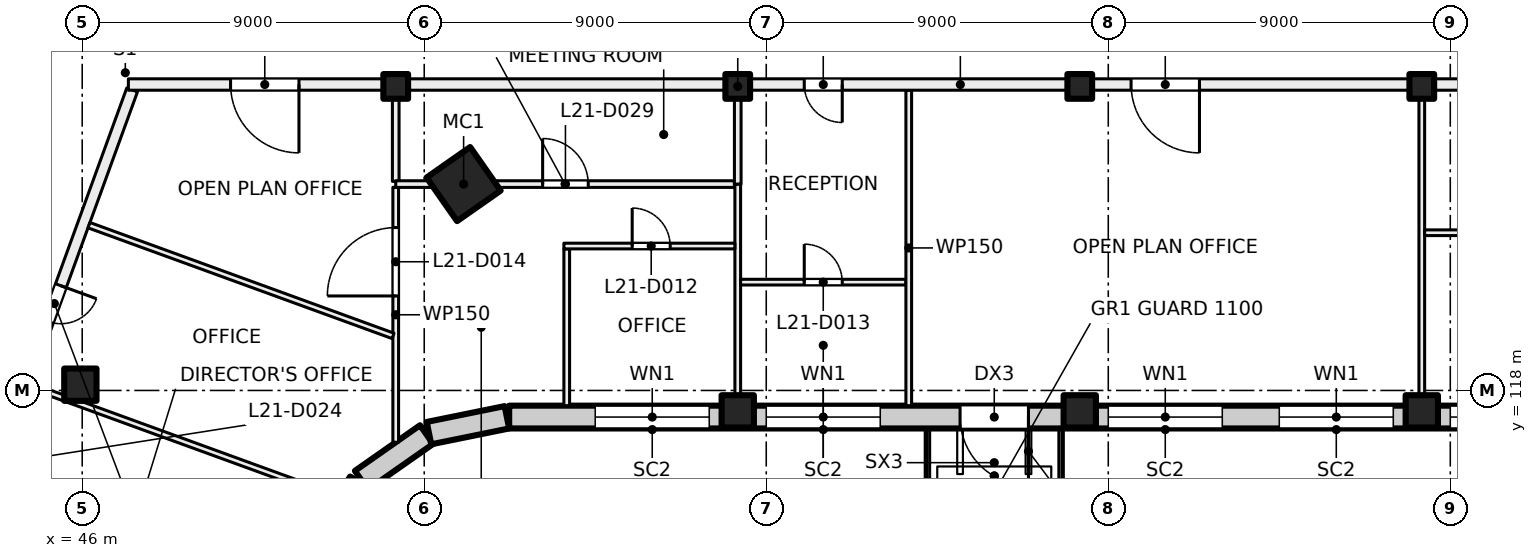
"""IFC4 building model, lengths in metres.
Left out: names, types, materials, properties, quantities, classifications, styles, units other than length and angle.
Written with IfcOpenShell. Run it as: python <this file> out.ifc"""

import sys

from ifc_helpers import new_model, si_unit, direction, frame, frame_2d, origin, origin_2d, place, context, subcontext, project, spatial, rectangle, hollow_rectangle, extrude, element, fill, save


model = new_model("IFC4")
c1 = context("Model", 3, precision=1e-05, world=origin(), true_north=direction((0.0, 1.0)))
c2 = subcontext(c1, "Body", "Model", "MODEL_VIEW")
j1 = project(units=[si_unit("LENGTHUNIT", "METRE"), si_unit("PLANEANGLEUNIT", "RADIAN")], contexts=[c1])
p1 = place(None, origin())
s1 = spatial("IfcSite", under=j1, at=p1, CompositionType="ELEMENT")
p2 = place(p1, origin())
s2 = spatial("IfcBuilding", under=s1, at=p2, CompositionType="ELEMENT")
p3 = place(p2, frame((0.0, 0.0, 93.0)))
s3 = spatial("IfcBuildingStorey", under=s2, at=p3, CompositionType="ELEMENT", Elevation=93.0)
p4 = place(p3, frame((56.036, 123.43, 0.0), z_axis=(0.0, 0.0, 1.0), x_axis=(0.573576436351, -0.819152044289, 0.0)))
e1 = element("IfcColumn", 1, at=p4, inside=s3, PredefinedType="COLUMN", context=c2, shape_type="SweptSolid", body=[
    extrude(hollow_rectangle(XDim=1.4, YDim=1.4, WallThickness=0.04, at=origin_2d()), origin(), (0.0, 0.0, 1.0), 4.0),
])
for number, where, z_axis, x_axis in (
    (2, (54.25, 126.0, 0.0), (0.0, 0.0, 1.0), (1.0, 0.0, 0.0)),
    (3, (63.25, 126.0, 0.0), (0.0, 0.0, 1.0), (1.0, 0.0, 0.0)),
    (4, (72.25, 126.0, 0.0), (0.0, 0.0, 1.0), (1.0, 0.0, 0.0)),
    (5, (81.25, 126.0, 0.0), (0.0, 0.0, 1.0), (1.0, 0.0, 0.0)),
):
    element("IfcColumn", number, at=place(p3, frame(where, z_axis=z_axis, x_axis=x_axis)), inside=s3, PredefinedType="COLUMN", context=c2, shape_type="SweptSolid", body=[
        extrude(rectangle(XDim=0.65, YDim=0.65, at=origin_2d()), origin(), (0.0, 0.0, 1.0), 4.0),
    ])
for number, where, z_axis, x_axis in (
    (6, (45.952, 118.152, 0.0), (0.0, 0.0, 1.0), (1.0, 0.0, 0.0)),
    (7, (63.25, 117.45, 0.0), (0.0, 0.0, 1.0), (1.0, 0.0, 0.0)),
    (8, (72.25, 117.45, 0.0), (0.0, 0.0, 1.0), (1.0, 0.0, 0.0)),
    (9, (81.25, 117.45, 0.0), (0.0, 0.0, 1.0), (1.0, 0.0, 0.0)),
):
    element("IfcColumn", number, at=place(p3, frame(where, z_axis=z_axis, x_axis=x_axis)), inside=s3, PredefinedType="COLUMN", context=c2, shape_type="SweptSolid", body=[
        extrude(rectangle(XDim=0.85, YDim=0.85, at=origin_2d()), origin(), (0.0, 0.0, 1.0), 4.0),
    ])
p5 = place(p3, frame((53.305, 115.578, 0.0), z_axis=(0.0, 0.0, 1.0), x_axis=(-0.522402266438, -0.852699168535, 0.0)))
e10 = element("IfcWall", 10, at=p5, inside=s3, PredefinedType="SOLIDWALL", context=c2, shape_type="SweptSolid", body=[
    extrude(rectangle(XDim=2.042, YDim=0.6, at=frame_2d((1.021, 0.0))), origin(), (0.0, 0.0, 1.0), 3.625),
])
for number, where, z_axis, x_axis in (
    (11, (55.062, 116.839, 0.0), (0.0, 0.0, 1.0), (-0.819, -0.574, 0.0)),
    (12, (57.175, 117.294, 0.0), (0.0, 0.0, 1.0), (-0.98, -0.199, 0.0)),
):
    element("IfcWall", number, at=place(p3, frame(where, z_axis=z_axis, x_axis=x_axis)), inside=s3, PredefinedType="SOLIDWALL", context=c2, shape_type="SweptSolid", body=[
        extrude(rectangle(XDim=2.092, YDim=0.6, at=frame_2d((1.046, 0.0))), origin(), (0.0, 0.0, 1.0), 3.625),
    ])
p6 = place(p3, frame((90.98, 117.3, 0.0), z_axis=(0.0, 0.0, 1.0), x_axis=(-1.0, 0.0, 0.0)))
e13 = element("IfcWall", 13, at=p6, inside=s3, PredefinedType="SOLIDWALL", context=c2, shape_type="SweptSolid", body=[
    extrude(rectangle(XDim=33.745, YDim=0.6, at=frame_2d((16.873, 0.0))), origin(), (0.0, 0.0, 1.0), 3.625),
])
p7 = place(p6, frame((1.48, 0.0, 0.9)))
e14 = element("IfcOpeningElement", 14, at=p7, cuts=e13, PredefinedType="OPENING", context=c2, shape_type="SweptSolid", body=[
    extrude(rectangle(XDim=3.0, YDim=2.4, at=frame_2d((1.5, 1.2))), frame((0.0, 0.31, 0.0), z_axis=(0.0, -1.0, 0.0), x_axis=(1.0, 0.0, 0.0)), (0.0, 0.0, 1.0), 0.62),
])
p8 = place(p6, frame((5.98, 0.0, 0.9)))
e15 = element("IfcOpeningElement", 15, at=p8, cuts=e13, PredefinedType="OPENING", context=c2, shape_type="SweptSolid", body=[
    extrude(rectangle(XDim=3.0, YDim=2.4, at=frame_2d((1.5, 1.2))), frame((0.0, 0.31, 0.0), z_axis=(0.0, -1.0, 0.0), x_axis=(1.0, 0.0, 0.0)), (0.0, 0.0, 1.0), 0.62),
])
p9 = place(p6, frame((10.48, 0.0, 0.9)))
e16 = element("IfcOpeningElement", 16, at=p9, cuts=e13, PredefinedType="OPENING", context=c2, shape_type="SweptSolid", body=[
    extrude(rectangle(XDim=3.0, YDim=2.4, at=frame_2d((1.5, 1.2))), frame((0.0, 0.31, 0.0), z_axis=(0.0, -1.0, 0.0), x_axis=(1.0, 0.0, 0.0)), (0.0, 0.0, 1.0), 0.62),
])
p10 = place(p6, frame((14.98, 0.0, 0.9)))
e17 = element("IfcOpeningElement", 17, at=p10, cuts=e13, PredefinedType="OPENING", context=c2, shape_type="SweptSolid", body=[
    extrude(rectangle(XDim=3.0, YDim=2.4, at=frame_2d((1.5, 1.2))), frame((0.0, 0.31, 0.0), z_axis=(0.0, -1.0, 0.0), x_axis=(1.0, 0.0, 0.0)), (0.0, 0.0, 1.0), 0.62),
])
p11 = place(p6, frame((20.08, 0.0, 0.0)))
e18 = element("IfcOpeningElement", 18, at=p11, cuts=e13, PredefinedType="OPENING", context=c2, shape_type="SweptSolid", body=[
    extrude(rectangle(XDim=1.8, YDim=2.4, at=frame_2d((0.9, 1.2))), frame((0.0, 0.31, 0.0), z_axis=(0.0, -1.0, 0.0), x_axis=(1.0, 0.0, 0.0)), (0.0, 0.0, 1.0), 0.62),
])
p12 = place(p6, frame((23.98, 0.0, 0.9)))
e19 = element("IfcOpeningElement", 19, at=p12, cuts=e13, PredefinedType="OPENING", context=c2, shape_type="SweptSolid", body=[
    extrude(rectangle(XDim=3.0, YDim=2.4, at=frame_2d((1.5, 1.2))), frame((0.0, 0.31, 0.0), z_axis=(0.0, -1.0, 0.0), x_axis=(1.0, 0.0, 0.0)), (0.0, 0.0, 1.0), 0.62),
])
p13 = place(p6, frame((28.48, 0.0, 0.9)))
e20 = element("IfcOpeningElement", 20, at=p13, cuts=e13, PredefinedType="OPENING", context=c2, shape_type="SweptSolid", body=[
    extrude(rectangle(XDim=3.0, YDim=2.4, at=frame_2d((1.5, 1.2))), frame((0.0, 0.31, 0.0), z_axis=(0.0, -1.0, 0.0), x_axis=(1.0, 0.0, 0.0)), (0.0, 0.0, 1.0), 0.62),
])
p14 = place(p3, frame((44.639, 118.12, 0.0), z_axis=(0.0, 0.0, 1.0), x_axis=(0.939669707102, -0.342083091593, 0.0)))
e21 = element("IfcWall", 21, at=p14, inside=s3, PredefinedType="PARTITIONING", context=c2, shape_type="SweptSolid", body=[
    extrude(rectangle(XDim=8.589, YDim=0.15, at=frame_2d((4.295, 0.0))), origin(), (0.0, 0.0, 1.0), 3.625),
])
p15 = place(p3, frame((47.314, 125.909, 0.0), z_axis=(0.0, 0.0, 1.0), x_axis=(-0.342010770371, -0.939696032209, 0.0)))
e22 = element("IfcWall", 22, at=p15, inside=s3, PredefinedType="PARTITIONING", context=c2, shape_type="SweptSolid", body=[
    extrude(rectangle(XDim=31.485, YDim=0.3, at=frame_2d((15.742, 0.0))), origin(), (0.0, 0.0, 1.0), 3.625),
])
p16 = place(p15, frame((26.11, 0.0, 0.0)))
e23 = element("IfcOpeningElement", 23, at=p16, cuts=e22, PredefinedType="OPENING", context=c2, shape_type="SweptSolid", body=[
    extrude(rectangle(XDim=1.0, YDim=2.1, at=frame_2d((0.5, 1.05))), frame((0.0, 0.16, 0.0), z_axis=(0.0, -1.0, 0.0), x_axis=(1.0, 0.0, 0.0)), (0.0, 0.0, 1.0), 0.32),
])
p17 = place(p15, frame((15.485, 0.0, 0.0)))
e24 = element("IfcOpeningElement", 24, at=p17, cuts=e22, PredefinedType="OPENING", context=c2, shape_type="SweptSolid", body=[
    extrude(rectangle(XDim=1.0, YDim=2.1, at=frame_2d((0.5, 1.05))), frame((0.0, 0.16, 0.0), z_axis=(0.0, -1.0, 0.0), x_axis=(1.0, 0.0, 0.0)), (0.0, 0.0, 1.0), 0.32),
])
p18 = place(p15, frame((9.985, 0.0, 0.0)))
e25 = element("IfcOpeningElement", 25, at=p18, cuts=e22, PredefinedType="OPENING", context=c2, shape_type="SweptSolid", body=[
    extrude(rectangle(XDim=1.0, YDim=2.1, at=frame_2d((0.5, 1.05))), frame((0.0, 0.16, 0.0), z_axis=(0.0, -1.0, 0.0), x_axis=(1.0, 0.0, 0.0)), (0.0, 0.0, 1.0), 0.32),
])
p19 = place(p15, frame((5.484, 0.0, 0.0)))
e26 = element("IfcOpeningElement", 26, at=p19, cuts=e22, PredefinedType="OPENING", context=c2, shape_type="SweptSolid", body=[
    extrude(rectangle(XDim=1.0, YDim=2.1, at=frame_2d((0.5, 1.05))), frame((0.0, 0.16, 0.0), z_axis=(0.0, -1.0, 0.0), x_axis=(1.0, 0.0, 0.0)), (0.0, 0.0, 1.0), 0.32),
])
p20 = place(p3, frame((54.25, 116.637, 0.0), z_axis=(0.0, 0.0, 1.0), x_axis=(0.0, 1.0, 0.0)))
e27 = element("IfcWall", 27, at=p20, inside=s3, PredefinedType="PARTITIONING", context=c2, shape_type="SweptSolid", body=[
    extrude(rectangle(XDim=6.709, YDim=0.15, at=frame_2d((3.354, 0.0))), origin(), (0.0, 0.0, 1.0), 3.625),
])
p21 = place(p20, frame((3.85, 0.0, 0.0)))
e28 = element("IfcOpeningElement", 28, at=p21, cuts=e27, PredefinedType="OPENING", context=c2, shape_type="SweptSolid", body=[
    extrude(rectangle(XDim=1.8, YDim=2.1, at=frame_2d((0.9, 1.05))), frame((0.0, 0.085, 0.0), z_axis=(0.0, -1.0, 0.0), x_axis=(1.0, 0.0, 0.0)), (0.0, 0.0, 1.0), 0.17),
])
p22 = place(p3, frame((54.18, 119.436, 0.0), z_axis=(0.0, 0.0, 1.0), x_axis=(-0.939669476286, 0.342083725624, 0.0)))
e29 = element("IfcWall", 29, at=p22, inside=s3, PredefinedType="PARTITIONING", context=c2, shape_type="SweptSolid", body=[
    extrude(rectangle(XDim=8.516, YDim=0.15, at=frame_2d((4.258, 0.0))), origin(), (0.0, 0.0, 1.0), 3.625),
])
p23 = place(p3, frame((54.25, 123.502, 0.0), z_axis=(0.0, 0.0, 1.0), x_axis=(0.0, 1.0, 0.0)))
e30 = element("IfcWall", 30, at=p23, inside=s3, PredefinedType="PARTITIONING", context=c2, shape_type="SweptSolid", body=[
    extrude(rectangle(XDim=2.398, YDim=0.175, at=frame_2d((1.199, 0.0))), origin(), (0.0, 0.0, 1.0), 3.625),
])
p24 = place(p3, frame((54.25, 123.43, 0.0), z_axis=(0.0, 0.0, 1.0), x_axis=(1.0, 0.0, 0.0)))
e31 = element("IfcWall", 31, at=p24, inside=s3, PredefinedType="PARTITIONING", context=c2, shape_type="SweptSolid", body=[
    extrude(rectangle(XDim=8.912, YDim=0.175, at=frame_2d((4.456, 0.0))), origin(), (0.0, 0.0, 1.0), 3.625),
])
p25 = place(p24, frame((3.866, 0.0, 0.0)))
e32 = element("IfcOpeningElement", 32, at=p25, cuts=e31, PredefinedType="OPENING", context=c2, shape_type="SweptSolid", body=[
    extrude(rectangle(XDim=1.2, YDim=2.1, at=frame_2d((0.6, 1.05))), frame((0.0, 0.097, 0.0), z_axis=(0.0, -1.0, 0.0), x_axis=(1.0, 0.0, 0.0)), (0.0, 0.0, 1.0), 0.195),
])
p26 = place(p3, frame((58.75, 117.6, 0.0), z_axis=(0.0, 0.0, 1.0), x_axis=(0.0, 1.0, 0.0)))
e33 = element("IfcWall", 33, at=p26, inside=s3, PredefinedType="PARTITIONING", context=c2, shape_type="SweptSolid", body=[
    extrude(rectangle(XDim=4.125, YDim=0.15, at=frame_2d((2.062, 0.0))), origin(), (0.0, 0.0, 1.0), 3.625),
])
p27 = place(p3, frame((63.25, 117.6, 0.0), z_axis=(0.0, 0.0, 1.0), x_axis=(0.0, 1.0, 0.0)))
e34 = element("IfcWall", 34, at=p27, inside=s3, PredefinedType="PARTITIONING", context=c2, shape_type="SweptSolid", body=[
    extrude(rectangle(XDim=5.83, YDim=0.15, at=frame_2d((2.915, 0.0))), origin(), (0.0, 0.0, 1.0), 3.625),
])
p28 = place(p3, frame((63.325, 120.85, 0.0), z_axis=(0.0, 0.0, 1.0), x_axis=(1.0, 0.0, 0.0)))
e35 = element("IfcWall", 35, at=p28, inside=s3, PredefinedType="PARTITIONING", context=c2, shape_type="SweptSolid", body=[
    extrude(rectangle(XDim=4.35, YDim=0.15, at=frame_2d((2.175, 0.0))), origin(), (0.0, 0.0, 1.0), 3.625),
])
p29 = place(p28, frame((1.675, 0.0, 0.0)))
e36 = element("IfcOpeningElement", 36, at=p29, cuts=e35, PredefinedType="OPENING", context=c2, shape_type="SweptSolid", body=[
    extrude(rectangle(XDim=1.0, YDim=2.1, at=frame_2d((0.5, 1.05))), frame((0.0, 0.085, 0.0), z_axis=(0.0, -1.0, 0.0), x_axis=(1.0, 0.0, 0.0)), (0.0, 0.0, 1.0), 0.17),
])
p30 = place(p3, frame((58.675, 121.8, 0.0), z_axis=(0.0, 0.0, 1.0), x_axis=(1.0, 0.0, 0.0)))
e37 = element("IfcWall", 37, at=p30, inside=s3, PredefinedType="PARTITIONING", context=c2, shape_type="SweptSolid", body=[
    extrude(rectangle(XDim=4.5, YDim=0.15, at=frame_2d((2.25, 0.0))), origin(), (0.0, 0.0, 1.0), 3.625),
])
p31 = place(p30, frame((1.798, 0.0, 0.0)))
e38 = element("IfcOpeningElement", 38, at=p31, cuts=e37, PredefinedType="OPENING", context=c2, shape_type="SweptSolid", body=[
    extrude(rectangle(XDim=1.0, YDim=2.1, at=frame_2d((0.5, 1.05))), frame((0.0, 0.085, 0.0), z_axis=(0.0, -1.0, 0.0), x_axis=(1.0, 0.0, 0.0)), (0.0, 0.0, 1.0), 0.17),
])
p32 = place(p3, frame((63.25, 123.43, 0.0), z_axis=(0.0, 0.0, 1.0), x_axis=(0.0, 1.0, 0.0)))
e39 = element("IfcWall", 39, at=p32, inside=s3, PredefinedType="PARTITIONING", context=c2, shape_type="SweptSolid", body=[
    extrude(rectangle(XDim=2.47, YDim=0.175, at=frame_2d((1.235, 0.0))), origin(), (0.0, 0.0, 1.0), 3.625),
])
for number, where, z_axis, x_axis in (
    (40, (67.75, 117.6, 0.0), (0.0, 0.0, 1.0), (0.0, 1.0, 0.0)),
    (41, (81.25, 117.6, 0.0), (0.0, 0.0, 1.0), (0.0, 1.0, 0.0)),
):
    element("IfcWall", number, at=place(p3, frame(where, z_axis=z_axis, x_axis=x_axis)), inside=s3, PredefinedType="PARTITIONING", context=c2, shape_type="SweptSolid", body=[
        extrude(rectangle(XDim=8.3, YDim=0.15, at=frame_2d((4.15, 0.0))), origin(), (0.0, 0.0, 1.0), 3.625),
    ])
p33 = place(p3, frame((84.175, 122.15, 0.0), z_axis=(0.0, 0.0, 1.0), x_axis=(-1.0, 0.0, 0.0)))
e42 = element("IfcWall", 42, at=p33, inside=s3, PredefinedType="PARTITIONING", context=c2, shape_type="SweptSolid", body=[
    extrude(rectangle(XDim=2.85, YDim=0.15, at=frame_2d((1.425, 0.0))), origin(), (0.0, 0.0, 1.0), 3.625),
])
p34 = place(p3, frame((91.0, 126.05, 0.0), z_axis=(0.0, 0.0, 1.0), x_axis=(-1.0, 0.0, 0.0)))
e43 = element("IfcWall", 43, at=p34, inside=s3, PredefinedType="PARTITIONING", context=c2, shape_type="SweptSolid", body=[
    extrude(rectangle(XDim=43.785, YDim=0.3, at=frame_2d((21.893, 0.0))), origin(), (0.0, 0.0, 1.0), 3.625),
])
p35 = place(p34, frame((7.85, 0.0, 0.0)))
e44 = element("IfcOpeningElement", 44, at=p35, cuts=e43, PredefinedType="OPENING", context=c2, shape_type="SweptSolid", body=[
    extrude(rectangle(XDim=0.8, YDim=2.1, at=frame_2d((0.4, 1.05))), frame((0.0, 0.16, 0.0), z_axis=(0.0, -1.0, 0.0), x_axis=(1.0, 0.0, 0.0)), (0.0, 0.0, 1.0), 0.32),
])
p36 = place(p34, frame((2.875, 0.0, 0.0)))
e45 = element("IfcOpeningElement", 45, at=p36, cuts=e43, PredefinedType="OPENING", context=c2, shape_type="SweptSolid", body=[
    extrude(rectangle(XDim=1.0, YDim=2.1, at=frame_2d((0.5, 1.05))), frame((0.0, 0.16, 0.0), z_axis=(0.0, -1.0, 0.0), x_axis=(1.0, 0.0, 0.0)), (0.0, 0.0, 1.0), 0.32),
])
p37 = place(p34, frame((15.6, 0.0, 0.0)))
e46 = element("IfcOpeningElement", 46, at=p37, cuts=e43, PredefinedType="OPENING", context=c2, shape_type="SweptSolid", body=[
    extrude(rectangle(XDim=1.8, YDim=2.1, at=frame_2d((0.9, 1.05))), frame((0.0, 0.16, 0.0), z_axis=(0.0, -1.0, 0.0), x_axis=(1.0, 0.0, 0.0)), (0.0, 0.0, 1.0), 0.32),
])
p38 = place(p34, frame((25.0, 0.0, 0.0)))
e47 = element("IfcOpeningElement", 47, at=p38, cuts=e43, PredefinedType="OPENING", context=c2, shape_type="SweptSolid", body=[
    extrude(rectangle(XDim=1.0, YDim=2.1, at=frame_2d((0.5, 1.05))), frame((0.0, 0.16, 0.0), z_axis=(0.0, -1.0, 0.0), x_axis=(1.0, 0.0, 0.0)), (0.0, 0.0, 1.0), 0.32),
])
p39 = place(p34, frame((39.296, 0.0, 0.0)))
e48 = element("IfcOpeningElement", 48, at=p39, cuts=e43, PredefinedType="OPENING", context=c2, shape_type="SweptSolid", body=[
    extrude(rectangle(XDim=1.8, YDim=2.1, at=frame_2d((0.9, 1.05))), frame((0.0, 0.16, 0.0), z_axis=(0.0, -1.0, 0.0), x_axis=(1.0, 0.0, 0.0)), (0.0, 0.0, 1.0), 0.32),
])
p40 = place(p8, origin())
e49 = element("IfcWindow", 49, at=p40, inside=s3, PartitioningType="SINGLE_PANEL", PredefinedType="WINDOW", context=c2, shape_type="SweptSolid", body=[
    extrude(rectangle(XDim=3.0, YDim=2.4, at=frame_2d((1.5, 1.2))), frame((0.0, 0.03, 0.0), z_axis=(0.0, -1.0, 0.0), x_axis=(1.0, 0.0, 0.0)), (0.0, 0.0, 1.0), 0.06),
])
fill(e15, e49)
p41 = place(p9, origin())
e50 = element("IfcWindow", 50, at=p41, inside=s3, PartitioningType="SINGLE_PANEL", PredefinedType="WINDOW", context=c2, shape_type="SweptSolid", body=[
    extrude(rectangle(XDim=3.0, YDim=2.4, at=frame_2d((1.5, 1.2))), frame((0.0, 0.03, 0.0), z_axis=(0.0, -1.0, 0.0), x_axis=(1.0, 0.0, 0.0)), (0.0, 0.0, 1.0), 0.06),
])
fill(e16, e50)
p42 = place(p10, origin())
e51 = element("IfcWindow", 51, at=p42, inside=s3, PartitioningType="SINGLE_PANEL", PredefinedType="WINDOW", context=c2, shape_type="SweptSolid", body=[
    extrude(rectangle(XDim=3.0, YDim=2.4, at=frame_2d((1.5, 1.2))), frame((0.0, 0.03, 0.0), z_axis=(0.0, -1.0, 0.0), x_axis=(1.0, 0.0, 0.0)), (0.0, 0.0, 1.0), 0.06),
])
fill(e17, e51)
p43 = place(p11, origin())
e52 = element("IfcDoor", 52, at=p43, inside=s3, OperationType="DOUBLE_DOOR_SINGLE_SWING", PredefinedType="DOOR", context=c2, shape_type="SweptSolid", body=[
    extrude(rectangle(XDim=1.8, YDim=2.4, at=frame_2d((0.9, 1.2))), frame((0.0, 0.025, 0.0), z_axis=(0.0, -1.0, 0.0), x_axis=(1.0, 0.0, 0.0)), (0.0, 0.0, 1.0), 0.05),
])
fill(e18, e52)
p44 = place(p12, origin())
e53 = element("IfcWindow", 53, at=p44, inside=s3, PartitioningType="SINGLE_PANEL", PredefinedType="WINDOW", context=c2, shape_type="SweptSolid", body=[
    extrude(rectangle(XDim=3.0, YDim=2.4, at=frame_2d((1.5, 1.2))), frame((0.0, 0.03, 0.0), z_axis=(0.0, -1.0, 0.0), x_axis=(1.0, 0.0, 0.0)), (0.0, 0.0, 1.0), 0.06),
])
fill(e19, e53)
p45 = place(p13, origin())
e54 = element("IfcWindow", 54, at=p45, inside=s3, PartitioningType="SINGLE_PANEL", PredefinedType="WINDOW", context=c2, shape_type="SweptSolid", body=[
    extrude(rectangle(XDim=3.0, YDim=2.4, at=frame_2d((1.5, 1.2))), frame((0.0, 0.03, 0.0), z_axis=(0.0, -1.0, 0.0), x_axis=(1.0, 0.0, 0.0)), (0.0, 0.0, 1.0), 0.06),
])
fill(e20, e54)
p46 = place(p37, origin())
e55 = element("IfcDoor", 55, at=p46, inside=s3, OperationType="DOUBLE_DOOR_SINGLE_SWING", PredefinedType="DOOR", context=c2, shape_type="SweptSolid", body=[
    extrude(rectangle(XDim=1.8, YDim=2.1, at=frame_2d((0.9, 1.05))), frame((0.0, 0.025, 0.0), z_axis=(0.0, -1.0, 0.0), x_axis=(1.0, 0.0, 0.0)), (0.0, 0.0, 1.0), 0.05),
])
fill(e46, e55)
p47 = place(p38, origin())
e56 = element("IfcDoor", 56, at=p47, inside=s3, OperationType="SINGLE_SWING_LEFT", PredefinedType="DOOR", context=c2, shape_type="SweptSolid", body=[
    extrude(rectangle(XDim=1.0, YDim=2.1, at=frame_2d((0.5, 1.05))), frame((0.0, 0.025, 0.0), z_axis=(0.0, -1.0, 0.0), x_axis=(1.0, 0.0, 0.0)), (0.0, 0.0, 1.0), 0.05),
])
fill(e47, e56)
p48 = place(p31, origin())
e57 = element("IfcDoor", 57, at=p48, inside=s3, OperationType="SINGLE_SWING_LEFT", PredefinedType="DOOR", context=c2, shape_type="SweptSolid", body=[
    extrude(rectangle(XDim=1.0, YDim=2.1, at=frame_2d((0.5, 1.05))), frame((0.0, 0.025, 0.0), z_axis=(0.0, -1.0, 0.0), x_axis=(1.0, 0.0, 0.0)), (0.0, 0.0, 1.0), 0.05),
])
fill(e38, e57)
p49 = place(p29, origin())
e58 = element("IfcDoor", 58, at=p49, inside=s3, OperationType="SINGLE_SWING_LEFT", PredefinedType="DOOR", context=c2, shape_type="SweptSolid", body=[
    extrude(rectangle(XDim=1.0, YDim=2.1, at=frame_2d((0.5, 1.05))), frame((0.0, 0.025, 0.0), z_axis=(0.0, -1.0, 0.0), x_axis=(1.0, 0.0, 0.0)), (0.0, 0.0, 1.0), 0.05),
])
fill(e36, e58)
p50 = place(p21, origin())
e59 = element("IfcDoor", 59, at=p50, inside=s3, OperationType="DOUBLE_DOOR_SINGLE_SWING", PredefinedType="DOOR", context=c2, shape_type="SweptSolid", body=[
    extrude(rectangle(XDim=1.8, YDim=2.1, at=frame_2d((0.9, 1.05))), frame((0.0, 0.025, 0.0), z_axis=(0.0, -1.0, 0.0), x_axis=(1.0, 0.0, 0.0)), (0.0, 0.0, 1.0), 0.05),
])
fill(e28, e59)
p51 = place(p19, origin())
e60 = element("IfcDoor", 60, at=p51, inside=s3, OperationType="SINGLE_SWING_LEFT", PredefinedType="DOOR", context=c2, shape_type="SweptSolid", body=[
    extrude(rectangle(XDim=1.0, YDim=2.1, at=frame_2d((0.5, 1.05))), frame((0.0, 0.025, 0.0), z_axis=(0.0, -1.0, 0.0), x_axis=(1.0, 0.0, 0.0)), (0.0, 0.0, 1.0), 0.05),
])
fill(e26, e60)
p52 = place(p39, origin())
e61 = element("IfcDoor", 61, at=p52, inside=s3, OperationType="DOUBLE_DOOR_SINGLE_SWING", PredefinedType="DOOR", context=c2, shape_type="SweptSolid", body=[
    extrude(rectangle(XDim=1.8, YDim=2.1, at=frame_2d((0.9, 1.05))), frame((0.0, 0.025, 0.0), z_axis=(0.0, -1.0, 0.0), x_axis=(1.0, 0.0, 0.0)), (0.0, 0.0, 1.0), 0.05),
])
fill(e48, e61)
p53 = place(p25, origin())
e62 = element("IfcDoor", 62, at=p53, inside=s3, OperationType="DOUBLE_DOOR_SINGLE_SWING", PredefinedType="DOOR", context=c2, shape_type="SweptSolid", body=[
    extrude(rectangle(XDim=1.2, YDim=2.1, at=frame_2d((0.6, 1.05))), frame((0.0, 0.025, 0.0), z_axis=(0.0, -1.0, 0.0), x_axis=(1.0, 0.0, 0.0)), (0.0, 0.0, 1.0), 0.05),
])
fill(e32, e62)
save(model, sys.argv[1])
